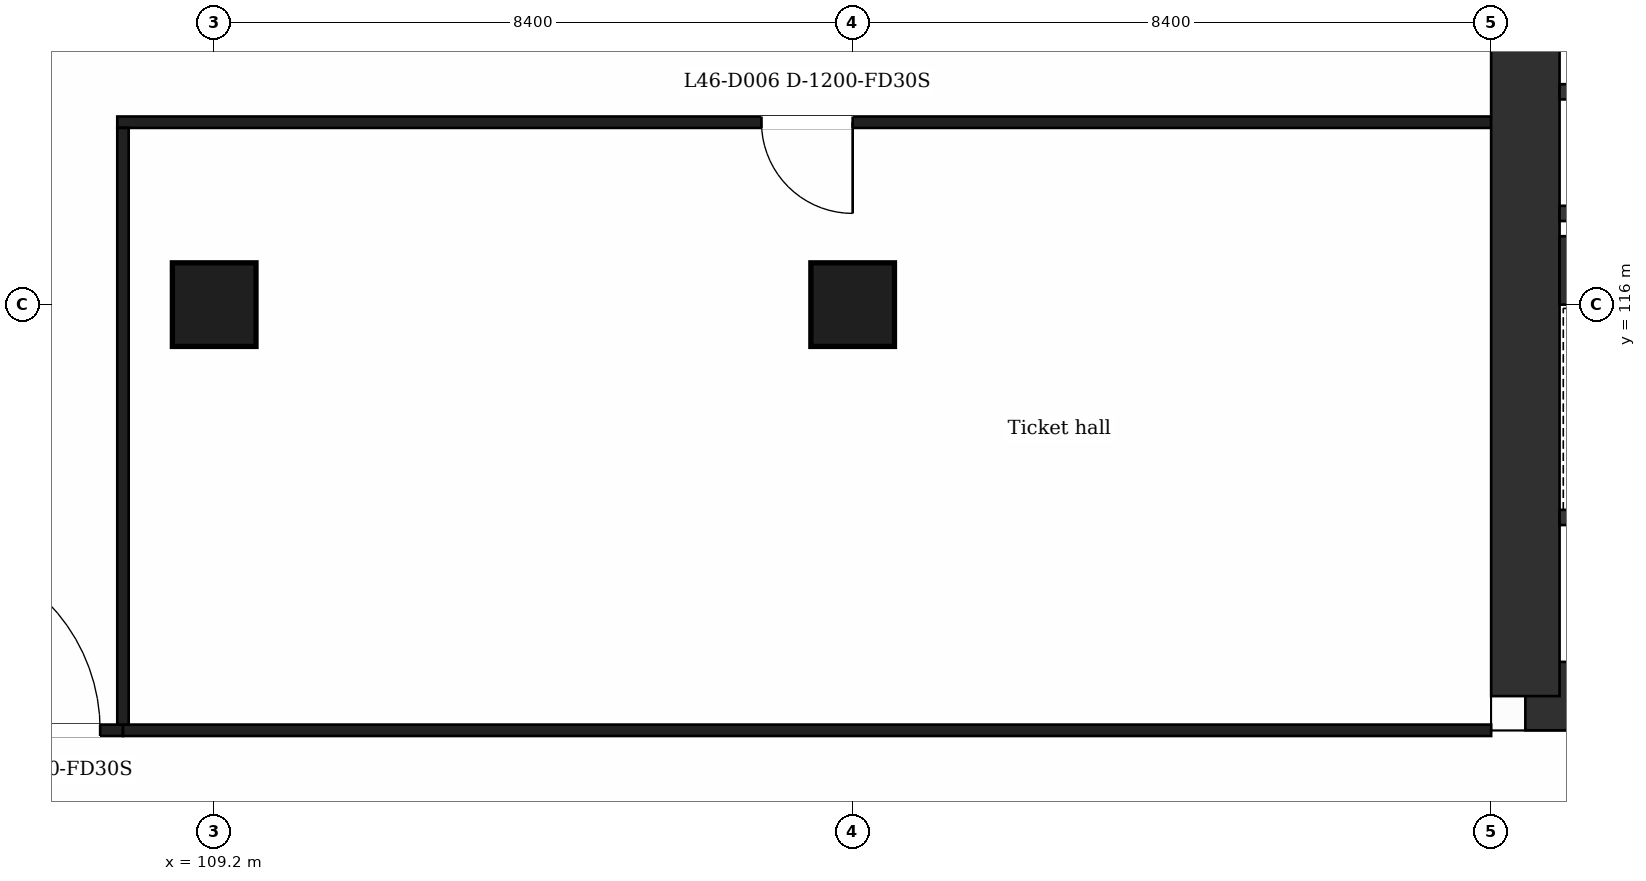
"""IFC4 building model, lengths in metres.
Left out: names, types, materials, properties, quantities, classifications, styles, units other than length and angle.
Written with IfcOpenShell. Run it as: python <this file> out.ifc"""

import sys

from ifc_helpers import new_model, si_unit, direction, frame, frame_2d, origin, origin_2d, place, context, subcontext, project, spatial, rectangle, extrude, element, fill, save


model = new_model("IFC4")
c1 = context("Model", 3, precision=1e-05, world=origin(), true_north=direction((0.0, 1.0)))
c2 = subcontext(c1, "Body", "Model", "MODEL_VIEW")
j1 = project(units=[si_unit("LENGTHUNIT", "METRE"), si_unit("PLANEANGLEUNIT", "RADIAN")], contexts=[c1])
p1 = place(None, origin())
s1 = spatial("IfcSite", under=j1, at=p1, CompositionType="ELEMENT")
p2 = place(p1, origin())
s2 = spatial("IfcBuilding", under=s1, at=p2, CompositionType="ELEMENT")
p3 = place(p2, frame((0.0, 0.0, 192.2)))
s3 = spatial("IfcBuildingStorey", under=s2, at=p3, CompositionType="ELEMENT", Elevation=192.2)
p4 = place(p3, frame((140.616, 110.85, 0.0), z_axis=(0.0, 0.0, 1.0), x_axis=(-1.0, 0.0, 0.0)))
e1 = element("IfcWall", 1, at=p4, inside=s3, PredefinedType="SHEAR", context=c2, shape_type="SweptSolid", body=[
    extrude(rectangle(XDim=14.166, YDim=0.9, at=frame_2d((7.083, 0.0))), origin(), (0.0, 0.0, 1.0), 5.0),
])
p5 = place(p4, frame((6.911, 0.0, 0.0)))
e2 = element("IfcOpeningElement", 2, at=p5, cuts=e1, PredefinedType="OPENING", context=c2, shape_type="SweptSolid", body=[
    extrude(rectangle(XDim=1.4, YDim=2.1, at=frame_2d((0.7, 1.05))), frame((0.0, 0.46, 0.0), z_axis=(0.0, -1.0, 0.0), x_axis=(1.0, 0.0, 0.0)), (0.0, 0.0, 1.0), 0.92),
])
p6 = place(p3, frame((126.45, 110.85, 0.0), z_axis=(0.0, 0.0, 1.0), x_axis=(0.0, 1.0, 0.0)))
e3 = element("IfcWall", 3, at=p6, inside=s3, PredefinedType="SHEAR", context=c2, shape_type="SweptSolid", body=[
    extrude(rectangle(XDim=21.1, YDim=0.9, at=frame_2d((10.55, 0.0))), origin(), (0.0, 0.0, 1.0), 5.0),
])
p7 = place(p6, frame((11.9, 0.0, 0.0)))
e4 = element("IfcOpeningElement", 4, at=p7, cuts=e3, PredefinedType="OPENING", context=c2, shape_type="SweptSolid", body=[
    extrude(rectangle(XDim=1.4, YDim=2.1, at=frame_2d((0.7, 1.05))), frame((0.0, 0.46, 0.0), z_axis=(0.0, -1.0, 0.0), x_axis=(1.0, 0.0, 0.0)), (0.0, 0.0, 1.0), 0.92),
])
p8 = place(p3, frame((126.9, 116.45, 0.0), z_axis=(0.0, 0.0, 1.0), x_axis=(1.0, 0.0, 0.0)))
e5 = element("IfcWall", 5, at=p8, inside=s3, PredefinedType="SHEAR", context=c2, shape_type="SweptSolid", body=[
    extrude(rectangle(XDim=5.1, YDim=0.9, at=frame_2d((2.55, 0.0))), origin(), (0.0, 0.0, 1.0), 5.0),
])
for number, where, z_axis, x_axis in (
    (6, (109.2, 116.0, 0.0), (0.0, 0.0, 1.0), (1.0, 0.0, 0.0)),
    (7, (117.6, 116.0, 0.0), (0.0, 0.0, 1.0), (1.0, 0.0, 0.0)),
):
    element("IfcColumn", number, at=place(p3, frame(where, z_axis=z_axis, x_axis=x_axis)), inside=s3, PredefinedType="COLUMN", context=c2, shape_type="SweptSolid", body=[
        extrude(rectangle(XDim=1.1, YDim=1.1, at=origin_2d()), origin(), (0.0, 0.0, 1.0), 5.0),
    ])
p9 = place(p3, frame((105.0, 110.4, 0.0), z_axis=(0.0, 0.0, 1.0), x_axis=(1.0, 0.0, 0.0)))
e8 = element("IfcWall", 8, at=p9, inside=s3, PredefinedType="PARTITIONING", context=c2, shape_type="SweptSolid", body=[
    extrude(rectangle(XDim=3.0, YDim=0.15, at=frame_2d((1.5, 0.0))), origin(), (0.0, 0.0, 1.0), 4.5),
])
p10 = place(p9, frame((0.3, 0.0, 0.0)))
e9 = element("IfcOpeningElement", 9, at=p10, cuts=e8, PredefinedType="OPENING", context=c2, shape_type="SweptSolid", body=[
    extrude(rectangle(XDim=2.4, YDim=2.1, at=frame_2d((1.2, 1.05))), frame((0.0, 0.085, 0.0), z_axis=(0.0, -1.0, 0.0), x_axis=(1.0, 0.0, 0.0)), (0.0, 0.0, 1.0), 0.17),
])
p11 = place(p3, frame((108.0, 110.4, 0.0), z_axis=(0.0, 0.0, 1.0), x_axis=(1.0, 0.0, 0.0)))
e10 = element("IfcWall", 10, at=p11, inside=s3, PredefinedType="PARTITIONING", context=c2, shape_type="SweptSolid", body=[
    extrude(rectangle(XDim=18.0, YDim=0.15, at=frame_2d((9.0, 0.0))), origin(), (0.0, 0.0, 1.0), 4.5),
])
p12 = place(p3, frame((126.9, 113.2, 0.0), z_axis=(0.0, 0.0, 1.0), x_axis=(1.0, 0.0, 0.0)))
e11 = element("IfcWall", 11, at=p12, inside=s3, PredefinedType="PARTITIONING", context=c2, shape_type="SweptSolid", body=[
    extrude(rectangle(XDim=4.773, YDim=0.2, at=frame_2d((2.387, 0.0))), origin(), (0.0, 0.0, 1.0), 4.5),
])
p13 = place(p12, frame((0.484, 0.0, 0.0)))
e12 = element("IfcOpeningElement", 12, at=p13, cuts=e11, PredefinedType="OPENING", context=c2, shape_type="SweptSolid", body=[
    extrude(rectangle(XDim=1.1, YDim=2.1, at=frame_2d((0.55, 1.05))), frame((0.0, 0.11, 0.0), z_axis=(0.0, -1.0, 0.0), x_axis=(1.0, 0.0, 0.0)), (0.0, 0.0, 1.0), 0.22),
])
p14 = place(p3, frame((126.9, 117.2, 0.0), z_axis=(0.0, 0.0, 1.0), x_axis=(1.0, 0.0, 0.0)))
e13 = element("IfcWall", 13, at=p14, inside=s3, PredefinedType="PARTITIONING", context=c2, shape_type="SweptSolid", body=[
    extrude(rectangle(XDim=4.673, YDim=0.2, at=frame_2d((2.336, 0.0))), origin(), (0.0, 0.0, 1.0), 4.5),
])
p15 = place(p3, frame((107.925, 118.4, 0.0), z_axis=(0.0, 0.0, 1.0), x_axis=(1.0, 0.0, 0.0)))
e14 = element("IfcWall", 14, at=p15, inside=s3, PredefinedType="PARTITIONING", context=c2, shape_type="SweptSolid", body=[
    extrude(rectangle(XDim=18.075, YDim=0.15, at=frame_2d((9.038, 0.0))), origin(), (0.0, 0.0, 1.0), 4.5),
])
p16 = place(p15, frame((8.475, 0.0, 0.0)))
e15 = element("IfcOpeningElement", 15, at=p16, cuts=e14, PredefinedType="OPENING", context=c2, shape_type="SweptSolid", body=[
    extrude(rectangle(XDim=1.2, YDim=2.1, at=frame_2d((0.6, 1.05))), frame((0.0, 0.085, 0.0), z_axis=(0.0, -1.0, 0.0), x_axis=(1.0, 0.0, 0.0)), (0.0, 0.0, 1.0), 0.17),
])
p17 = place(p3, frame((126.9, 118.8, 0.0), z_axis=(0.0, 0.0, 1.0), x_axis=(1.0, 0.0, 0.0)))
e16 = element("IfcWall", 16, at=p17, inside=s3, PredefinedType="PARTITIONING", context=c2, shape_type="SweptSolid", body=[
    extrude(rectangle(XDim=4.673, YDim=0.2, at=frame_2d((2.336, 0.0))), origin(), (0.0, 0.0, 1.0), 4.5),
])
p18 = place(p3, frame((108.0, 110.475, 0.0), z_axis=(0.0, 0.0, 1.0), x_axis=(0.0, 1.0, 0.0)))
e17 = element("IfcWall", 17, at=p18, inside=s3, PredefinedType="PARTITIONING", context=c2, shape_type="SweptSolid", body=[
    extrude(rectangle(XDim=7.85, YDim=0.15, at=frame_2d((3.925, 0.0))), origin(), (0.0, 0.0, 1.0), 4.5),
])
p19 = place(p10, origin())
e18 = element("IfcDoor", 18, at=p19, inside=s3, OperationType="SINGLE_SWING_LEFT", PredefinedType="DOOR", context=c2, shape_type="SweptSolid", body=[
    extrude(rectangle(XDim=2.4, YDim=2.1, at=frame_2d((1.2, 1.05))), frame((0.0, 0.025, 0.0), z_axis=(0.0, -1.0, 0.0), x_axis=(1.0, 0.0, 0.0)), (0.0, 0.0, 1.0), 0.05),
])
fill(e9, e18)
p20 = place(p16, origin())
e19 = element("IfcDoor", 19, at=p20, inside=s3, OperationType="SINGLE_SWING_RIGHT", PredefinedType="DOOR", context=c2, shape_type="SweptSolid", body=[
    extrude(rectangle(XDim=1.2, YDim=2.1, at=frame_2d((0.6, 1.05))), frame((0.0, 0.025, 0.0), z_axis=(0.0, -1.0, 0.0), x_axis=(1.0, 0.0, 0.0)), (0.0, 0.0, 1.0), 0.05),
])
fill(e15, e19)
save(model, sys.argv[1])
